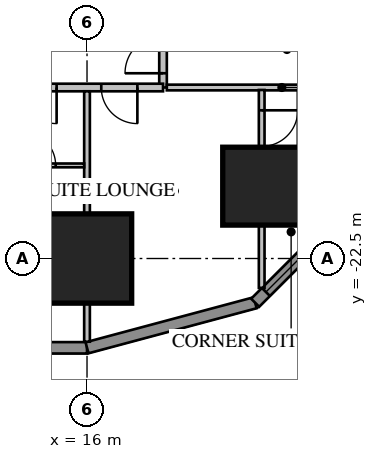
"""IFC4 building model, lengths in metres.
Left out: names, types, materials, properties, quantities, classifications, styles, units other than length and angle.
Written with IfcOpenShell. Run it as: python <this file> out.ifc"""

import sys

from ifc_helpers import new_model, si_unit, direction, frame, frame_2d, origin, origin_2d, place, context, subcontext, project, spatial, rectangle, extrude, element, fill, save


model = new_model("IFC4")
c1 = context("Model", 3, precision=1e-05, world=origin(), true_north=direction((0.0, 1.0)))
c2 = subcontext(c1, "Body", "Model", "MODEL_VIEW")
j1 = project(units=[si_unit("LENGTHUNIT", "METRE"), si_unit("PLANEANGLEUNIT", "RADIAN")], contexts=[c1])
p1 = place(None, origin())
s1 = spatial("IfcSite", under=j1, at=p1, CompositionType="ELEMENT")
p2 = place(p1, origin())
s2 = spatial("IfcBuilding", under=s1, at=p2, CompositionType="ELEMENT")
p3 = place(p2, frame((0.0, 0.0, 35.25)))
s3 = spatial("IfcBuildingStorey", under=s2, at=p3, CompositionType="ELEMENT", Elevation=35.25)
p4 = place(p3, frame((16.0, -22.5, 0.0), z_axis=(0.0, 0.0, 1.0), x_axis=(1.0, 0.0, 0.0)))
e1 = element("IfcColumn", 1, at=p4, inside=s3, PredefinedType="COLUMN", context=c2, shape_type="SweptSolid", body=[
    extrude(rectangle(XDim=2.35, YDim=2.35, at=origin_2d()), origin(), (0.0, 0.0, 1.0), 3.85),
])
p5 = place(p3, frame((20.596, -20.596, 0.0), z_axis=(0.0, 0.0, 1.0), x_axis=(1.0, 0.0, 0.0)))
e2 = element("IfcColumn", 2, at=p5, inside=s3, PredefinedType="COLUMN", context=c2, shape_type="SweptSolid", body=[
    extrude(rectangle(XDim=2.05, YDim=2.05, at=origin_2d()), origin(), (0.0, 0.0, 1.0), 3.85),
])
p6 = place(p3, frame((-16.0, -24.85, 0.0), z_axis=(0.0, 0.0, 1.0), x_axis=(1.0, 0.0, 0.0)))
e3 = element("IfcWall", 3, at=p6, inside=s3, PredefinedType="SOLIDWALL", context=c2, shape_type="SweptSolid", body=[
    extrude(rectangle(XDim=32.0, YDim=0.3, at=frame_2d((16.0, 0.0))), origin(), (0.0, 0.0, 1.0), 3.65),
])
p7 = place(p6, frame((1.2, 0.0, 0.75)))
e4 = element("IfcOpeningElement", 4, at=p7, cuts=e3, PredefinedType="OPENING", context=c2, shape_type="SweptSolid", body=[
    extrude(rectangle(XDim=1.6, YDim=1.8, at=frame_2d((0.8, 0.9))), frame((0.0, 0.17, 0.0), z_axis=(0.0, -1.0, 0.0), x_axis=(1.0, 0.0, 0.0)), (0.0, 0.0, 1.0), 0.34),
])
p8 = place(p6, frame((5.2, 0.0, 0.75)))
e5 = element("IfcOpeningElement", 5, at=p8, cuts=e3, PredefinedType="OPENING", context=c2, shape_type="SweptSolid", body=[
    extrude(rectangle(XDim=1.6, YDim=1.8, at=frame_2d((0.8, 0.9))), frame((0.0, 0.17, 0.0), z_axis=(0.0, -1.0, 0.0), x_axis=(1.0, 0.0, 0.0)), (0.0, 0.0, 1.0), 0.34),
])
p9 = place(p6, frame((17.2, 0.0, 0.75)))
e6 = element("IfcOpeningElement", 6, at=p9, cuts=e3, PredefinedType="OPENING", context=c2, shape_type="SweptSolid", body=[
    extrude(rectangle(XDim=1.6, YDim=1.8, at=frame_2d((0.8, 0.9))), frame((0.0, 0.17, 0.0), z_axis=(0.0, -1.0, 0.0), x_axis=(1.0, 0.0, 0.0)), (0.0, 0.0, 1.0), 0.34),
])
p10 = place(p6, frame((21.2, 0.0, 0.75)))
e7 = element("IfcOpeningElement", 7, at=p10, cuts=e3, PredefinedType="OPENING", context=c2, shape_type="SweptSolid", body=[
    extrude(rectangle(XDim=1.6, YDim=1.8, at=frame_2d((0.8, 0.9))), frame((0.0, 0.17, 0.0), z_axis=(0.0, -1.0, 0.0), x_axis=(1.0, 0.0, 0.0)), (0.0, 0.0, 1.0), 0.34),
])
p11 = place(p6, frame((25.2, 0.0, 0.75)))
e8 = element("IfcOpeningElement", 8, at=p11, cuts=e3, PredefinedType="OPENING", context=c2, shape_type="SweptSolid", body=[
    extrude(rectangle(XDim=1.6, YDim=1.8, at=frame_2d((0.8, 0.9))), frame((0.0, 0.17, 0.0), z_axis=(0.0, -1.0, 0.0), x_axis=(1.0, 0.0, 0.0)), (0.0, 0.0, 1.0), 0.34),
])
p12 = place(p6, frame((29.2, 0.0, 0.75)))
e9 = element("IfcOpeningElement", 9, at=p12, cuts=e3, PredefinedType="OPENING", context=c2, shape_type="SweptSolid", body=[
    extrude(rectangle(XDim=1.6, YDim=1.8, at=frame_2d((0.8, 0.9))), frame((0.0, 0.17, 0.0), z_axis=(0.0, -1.0, 0.0), x_axis=(1.0, 0.0, 0.0)), (0.0, 0.0, 1.0), 0.34),
])
p13 = place(p6, frame((8.8, 0.0, 0.75)))
e10 = element("IfcOpeningElement", 10, at=p13, cuts=e3, PredefinedType="OPENING", context=c2, shape_type="SweptSolid", body=[
    extrude(rectangle(XDim=2.4, YDim=1.8, at=frame_2d((1.2, 0.9))), frame((0.0, 0.17, 0.0), z_axis=(0.0, -1.0, 0.0), x_axis=(1.0, 0.0, 0.0)), (0.0, 0.0, 1.0), 0.34),
])
p14 = place(p6, frame((13.812, 0.0, 0.0)))
e11 = element("IfcOpeningElement", 11, at=p14, cuts=e3, PredefinedType="OPENING", context=c2, shape_type="SweptSolid", body=[
    extrude(rectangle(XDim=1.0, YDim=2.4, at=frame_2d((0.5, 1.2))), frame((0.0, 0.17, 0.0), z_axis=(0.0, -1.0, 0.0), x_axis=(1.0, 0.0, 0.0)), (0.0, 0.0, 1.0), 0.34),
])
p15 = place(p3, frame((16.0, -24.85, 0.0), z_axis=(0.0, 0.0, 1.0), x_axis=(0.965920218567, 0.258839972501, 0.0)))
e12 = element("IfcWall", 12, at=p15, inside=s3, PredefinedType="SOLIDWALL", context=c2, shape_type="SweptSolid", body=[
    extrude(rectangle(XDim=4.581, YDim=0.3, at=frame_2d((2.291, 0.0))), origin(), (0.0, 0.0, 1.0), 3.65),
])
p16 = place(p3, frame((20.425, -23.664, 0.0), z_axis=(0.0, 0.0, 1.0), x_axis=(0.707106781187, 0.707106781187, 0.0)))
e13 = element("IfcWall", 13, at=p16, inside=s3, PredefinedType="SOLIDWALL", context=c2, shape_type="SweptSolid", body=[
    extrude(rectangle(XDim=4.581, YDim=0.3, at=frame_2d((2.291, 0.0))), origin(), (0.0, 0.0, 1.0), 3.65),
])
p17 = place(p16, frame((0.4, 0.0, 0.75)))
e14 = element("IfcOpeningElement", 14, at=p17, cuts=e13, PredefinedType="OPENING", context=c2, shape_type="SweptSolid", body=[
    extrude(rectangle(XDim=3.781, YDim=1.8, at=frame_2d((1.891, 0.9))), frame((0.0, 0.17, 0.0), z_axis=(0.0, -1.0, 0.0), x_axis=(1.0, 0.0, 0.0)), (0.0, 0.0, 1.0), 0.34),
])
p18 = place(p3, frame((18.0, -18.0, 0.0), z_axis=(0.0, 0.0, 1.0), x_axis=(0.0, 1.0, 0.0)))
e15 = element("IfcWall", 15, at=p18, inside=s3, PredefinedType="PARTITIONING", context=c2, shape_type="SweptSolid", body=[
    extrude(rectangle(XDim=36.0, YDim=0.2, at=frame_2d((18.0, 0.0))), origin(), (0.0, 0.0, 1.0), 3.65),
])
p19 = place(p18, frame((10.4, 0.0, 0.0)))
e16 = element("IfcOpeningElement", 16, at=p19, cuts=e15, PredefinedType="OPENING", context=c2, shape_type="SweptSolid", body=[
    extrude(rectangle(XDim=1.0, YDim=2.1, at=frame_2d((0.5, 1.05))), frame((0.0, 0.12, 0.0), z_axis=(0.0, -1.0, 0.0), x_axis=(1.0, 0.0, 0.0)), (0.0, 0.0, 1.0), 0.24),
])
p20 = place(p18, frame((0.375, 0.0, 0.0)))
e17 = element("IfcOpeningElement", 17, at=p20, cuts=e15, PredefinedType="OPENING", context=c2, shape_type="SweptSolid", body=[
    extrude(rectangle(XDim=1.0, YDim=2.1, at=frame_2d((0.5, 1.05))), frame((0.0, 0.12, 0.0), z_axis=(0.0, -1.0, 0.0), x_axis=(1.0, 0.0, 0.0)), (0.0, 0.0, 1.0), 0.24),
])
p21 = place(p18, frame((34.375, 0.0, 0.0)))
e18 = element("IfcOpeningElement", 18, at=p21, cuts=e15, PredefinedType="OPENING", context=c2, shape_type="SweptSolid", body=[
    extrude(rectangle(XDim=0.95, YDim=2.1, at=frame_2d((0.475, 1.05))), frame((0.0, 0.12, 0.0), z_axis=(0.0, -1.0, 0.0), x_axis=(1.0, 0.0, 0.0)), (0.0, 0.0, 1.0), 0.24),
])
p22 = place(p3, frame((18.1, -18.0, 0.0), z_axis=(0.0, 0.0, 1.0), x_axis=(1.0, 0.0, 0.0)))
e19 = element("IfcWall", 19, at=p22, inside=s3, PredefinedType="PARTITIONING", context=c2, shape_type="SweptSolid", body=[
    extrude(rectangle(XDim=6.053, YDim=0.15, at=frame_2d((3.027, 0.0))), origin(), (0.0, 0.0, 1.0), 3.65),
])
p23 = place(p3, frame((-18.0, -18.0, 0.0), z_axis=(0.0, 0.0, 1.0), x_axis=(1.0, 0.0, 0.0)))
e20 = element("IfcWall", 20, at=p23, inside=s3, PredefinedType="PARTITIONING", context=c2, shape_type="SweptSolid", body=[
    extrude(rectangle(XDim=36.0, YDim=0.2, at=frame_2d((18.0, 0.0))), origin(), (0.0, 0.0, 1.0), 3.65),
])
p24 = place(p23, frame((0.375, 0.0, 0.0)))
e21 = element("IfcOpeningElement", 21, at=p24, cuts=e20, PredefinedType="OPENING", context=c2, shape_type="SweptSolid", body=[
    extrude(rectangle(XDim=1.0, YDim=2.1, at=frame_2d((0.5, 1.05))), frame((0.0, 0.12, 0.0), z_axis=(0.0, -1.0, 0.0), x_axis=(1.0, 0.0, 0.0)), (0.0, 0.0, 1.0), 0.24),
])
p25 = place(p23, frame((2.45, 0.0, 0.0)))
e22 = element("IfcOpeningElement", 22, at=p25, cuts=e20, PredefinedType="OPENING", context=c2, shape_type="SweptSolid", body=[
    extrude(rectangle(XDim=0.8, YDim=2.1, at=frame_2d((0.4, 1.05))), frame((0.0, 0.12, 0.0), z_axis=(0.0, -1.0, 0.0), x_axis=(1.0, 0.0, 0.0)), (0.0, 0.0, 1.0), 0.24),
])
p26 = place(p23, frame((4.05, 0.0, 0.0)))
e23 = element("IfcOpeningElement", 23, at=p26, cuts=e20, PredefinedType="OPENING", context=c2, shape_type="SweptSolid", body=[
    extrude(rectangle(XDim=1.0, YDim=2.1, at=frame_2d((0.5, 1.05))), frame((0.0, 0.12, 0.0), z_axis=(0.0, -1.0, 0.0), x_axis=(1.0, 0.0, 0.0)), (0.0, 0.0, 1.0), 0.24),
])
p27 = place(p23, frame((6.45, 0.0, 0.0)))
e24 = element("IfcOpeningElement", 24, at=p27, cuts=e20, PredefinedType="OPENING", context=c2, shape_type="SweptSolid", body=[
    extrude(rectangle(XDim=0.9, YDim=2.1, at=frame_2d((0.45, 1.05))), frame((0.0, 0.12, 0.0), z_axis=(0.0, -1.0, 0.0), x_axis=(1.0, 0.0, 0.0)), (0.0, 0.0, 1.0), 0.24),
])
p28 = place(p23, frame((8.15, 0.0, 0.0)))
e25 = element("IfcOpeningElement", 25, at=p28, cuts=e20, PredefinedType="OPENING", context=c2, shape_type="SweptSolid", body=[
    extrude(rectangle(XDim=1.0, YDim=2.1, at=frame_2d((0.5, 1.05))), frame((0.0, 0.12, 0.0), z_axis=(0.0, -1.0, 0.0), x_axis=(1.0, 0.0, 0.0)), (0.0, 0.0, 1.0), 0.24),
])
p29 = place(p23, frame((18.375, 0.0, 0.0)))
e26 = element("IfcOpeningElement", 26, at=p29, cuts=e20, PredefinedType="OPENING", context=c2, shape_type="SweptSolid", body=[
    extrude(rectangle(XDim=0.95, YDim=2.1, at=frame_2d((0.475, 1.05))), frame((0.0, 0.12, 0.0), z_axis=(0.0, -1.0, 0.0), x_axis=(1.0, 0.0, 0.0)), (0.0, 0.0, 1.0), 0.24),
])
p30 = place(p23, frame((24.25, 0.0, 0.0)))
e27 = element("IfcOpeningElement", 27, at=p30, cuts=e20, PredefinedType="OPENING", context=c2, shape_type="SweptSolid", body=[
    extrude(rectangle(XDim=0.95, YDim=2.1, at=frame_2d((0.475, 1.05))), frame((0.0, 0.12, 0.0), z_axis=(0.0, -1.0, 0.0), x_axis=(1.0, 0.0, 0.0)), (0.0, 0.0, 1.0), 0.24),
])
p31 = place(p23, frame((26.375, 0.0, 0.0)))
e28 = element("IfcOpeningElement", 28, at=p31, cuts=e20, PredefinedType="OPENING", context=c2, shape_type="SweptSolid", body=[
    extrude(rectangle(XDim=0.95, YDim=2.1, at=frame_2d((0.475, 1.05))), frame((0.0, 0.12, 0.0), z_axis=(0.0, -1.0, 0.0), x_axis=(1.0, 0.0, 0.0)), (0.0, 0.0, 1.0), 0.24),
])
p32 = place(p23, frame((32.25, 0.0, 0.0)))
e29 = element("IfcOpeningElement", 29, at=p32, cuts=e20, PredefinedType="OPENING", context=c2, shape_type="SweptSolid", body=[
    extrude(rectangle(XDim=0.95, YDim=2.1, at=frame_2d((0.475, 1.05))), frame((0.0, 0.12, 0.0), z_axis=(0.0, -1.0, 0.0), x_axis=(1.0, 0.0, 0.0)), (0.0, 0.0, 1.0), 0.24),
])
p33 = place(p23, frame((34.375, 0.0, 0.0)))
e30 = element("IfcOpeningElement", 30, at=p33, cuts=e20, PredefinedType="OPENING", context=c2, shape_type="SweptSolid", body=[
    extrude(rectangle(XDim=0.95, YDim=2.1, at=frame_2d((0.475, 1.05))), frame((0.0, 0.12, 0.0), z_axis=(0.0, -1.0, 0.0), x_axis=(1.0, 0.0, 0.0)), (0.0, 0.0, 1.0), 0.24),
])
p34 = place(p23, frame((11.2, 0.0, 0.0)))
e31 = element("IfcOpeningElement", 31, at=p34, cuts=e20, PredefinedType="OPENING", context=c2, shape_type="SweptSolid", body=[
    extrude(rectangle(XDim=1.0, YDim=2.1, at=frame_2d((0.5, 1.05))), frame((0.0, 0.12, 0.0), z_axis=(0.0, -1.0, 0.0), x_axis=(1.0, 0.0, 0.0)), (0.0, 0.0, 1.0), 0.24),
])
p35 = place(p3, frame((16.0, -18.1, 0.0), z_axis=(0.0, 0.0, 1.0), x_axis=(0.0, -1.0, 0.0)))
e32 = element("IfcWall", 32, at=p35, inside=s3, PredefinedType="PARTITIONING", context=c2, shape_type="SweptSolid", body=[
    extrude(rectangle(XDim=6.589, YDim=0.15, at=frame_2d((3.295, 0.0))), origin(), (0.0, 0.0, 1.0), 3.65),
])
p36 = place(p3, frame((20.596, -18.065, 0.0), z_axis=(0.0, 0.0, 1.0), x_axis=(0.0, -1.0, 0.0)))
e33 = element("IfcWall", 33, at=p36, inside=s3, PredefinedType="PARTITIONING", context=c2, shape_type="SweptSolid", body=[
    extrude(rectangle(XDim=5.209, YDim=0.15, at=frame_2d((2.604, 0.0))), origin(), (0.0, 0.0, 1.0), 3.65),
])
p37 = place(p36, frame((0.535, 0.0, 0.0)))
e34 = element("IfcOpeningElement", 34, at=p37, cuts=e33, PredefinedType="OPENING", context=c2, shape_type="SweptSolid", body=[
    extrude(rectangle(XDim=0.95, YDim=2.1, at=frame_2d((0.475, 1.05))), frame((0.0, 0.095, 0.0), z_axis=(0.0, -1.0, 0.0), x_axis=(1.0, 0.0, 0.0)), (0.0, 0.0, 1.0), 0.19),
])
p38 = place(p3, frame((14.075, -20.05, 0.0), z_axis=(0.0, 0.0, 1.0), x_axis=(1.0, 0.0, 0.0)))
e35 = element("IfcWall", 35, at=p38, inside=s3, PredefinedType="PARTITIONING", context=c2, shape_type="SweptSolid", body=[
    extrude(rectangle(XDim=1.85, YDim=0.1, at=frame_2d((0.925, 0.0))), origin(), (0.0, 0.0, 1.0), 3.65),
])
p39 = place(p38, frame((0.2, 0.0, 0.0)))
e36 = element("IfcOpeningElement", 36, at=p39, cuts=e35, PredefinedType="OPENING", context=c2, shape_type="SweptSolid", body=[
    extrude(rectangle(XDim=0.9, YDim=2.1, at=frame_2d((0.45, 1.05))), frame((0.0, 0.07, 0.0), z_axis=(0.0, -1.0, 0.0), x_axis=(1.0, 0.0, 0.0)), (0.0, 0.0, 1.0), 0.14),
])
p40 = place(p17, origin())
e37 = element("IfcWindow", 37, at=p40, inside=s3, PartitioningType="SINGLE_PANEL", PredefinedType="WINDOW", context=c2, shape_type="SweptSolid", body=[
    extrude(rectangle(XDim=3.781, YDim=1.8, at=frame_2d((1.891, 0.9))), frame((0.0, 0.03, 0.0), z_axis=(0.0, -1.0, 0.0), x_axis=(1.0, 0.0, 0.0)), (0.0, 0.0, 1.0), 0.06),
])
fill(e14, e37)
p41 = place(p20, origin())
e38 = element("IfcDoor", 38, at=p41, inside=s3, OperationType="SINGLE_SWING_LEFT", PredefinedType="DOOR", context=c2, shape_type="SweptSolid", body=[
    extrude(rectangle(XDim=1.0, YDim=2.1, at=frame_2d((0.5, 1.05))), frame((0.0, 0.025, 0.0), z_axis=(0.0, -1.0, 0.0), x_axis=(1.0, 0.0, 0.0)), (0.0, 0.0, 1.0), 0.05),
])
fill(e17, e38)
p42 = place(p32, origin())
e39 = element("IfcDoor", 39, at=p42, inside=s3, OperationType="SINGLE_SWING_RIGHT", PredefinedType="DOOR", context=c2, shape_type="SweptSolid", body=[
    extrude(rectangle(XDim=0.95, YDim=2.1, at=frame_2d((0.475, 1.05))), frame((0.0, 0.025, 0.0), z_axis=(0.0, -1.0, 0.0), x_axis=(1.0, 0.0, 0.0)), (0.0, 0.0, 1.0), 0.05),
])
fill(e29, e39)
p43 = place(p33, origin())
e40 = element("IfcDoor", 40, at=p43, inside=s3, OperationType="SINGLE_SWING_RIGHT", PredefinedType="DOOR", context=c2, shape_type="SweptSolid", body=[
    extrude(rectangle(XDim=0.95, YDim=2.1, at=frame_2d((0.475, 1.05))), frame((0.0, 0.025, 0.0), z_axis=(0.0, -1.0, 0.0), x_axis=(1.0, 0.0, 0.0)), (0.0, 0.0, 1.0), 0.05),
])
fill(e30, e40)
p44 = place(p37, origin())
e41 = element("IfcDoor", 41, at=p44, inside=s3, OperationType="SINGLE_SWING_LEFT", PredefinedType="DOOR", context=c2, shape_type="SweptSolid", body=[
    extrude(rectangle(XDim=0.95, YDim=2.1, at=frame_2d((0.475, 1.05))), frame((0.0, 0.025, 0.0), z_axis=(0.0, -1.0, 0.0), x_axis=(1.0, 0.0, 0.0)), (0.0, 0.0, 1.0), 0.05),
])
fill(e34, e41)
p45 = place(p39, origin())
e42 = element("IfcDoor", 42, at=p45, inside=s3, OperationType="SINGLE_SWING_LEFT", PredefinedType="DOOR", context=c2, shape_type="SweptSolid", body=[
    extrude(rectangle(XDim=0.9, YDim=2.1, at=frame_2d((0.45, 1.05))), frame((0.0, 0.025, 0.0), z_axis=(0.0, -1.0, 0.0), x_axis=(1.0, 0.0, 0.0)), (0.0, 0.0, 1.0), 0.05),
])
fill(e36, e42)
save(model, sys.argv[1])
